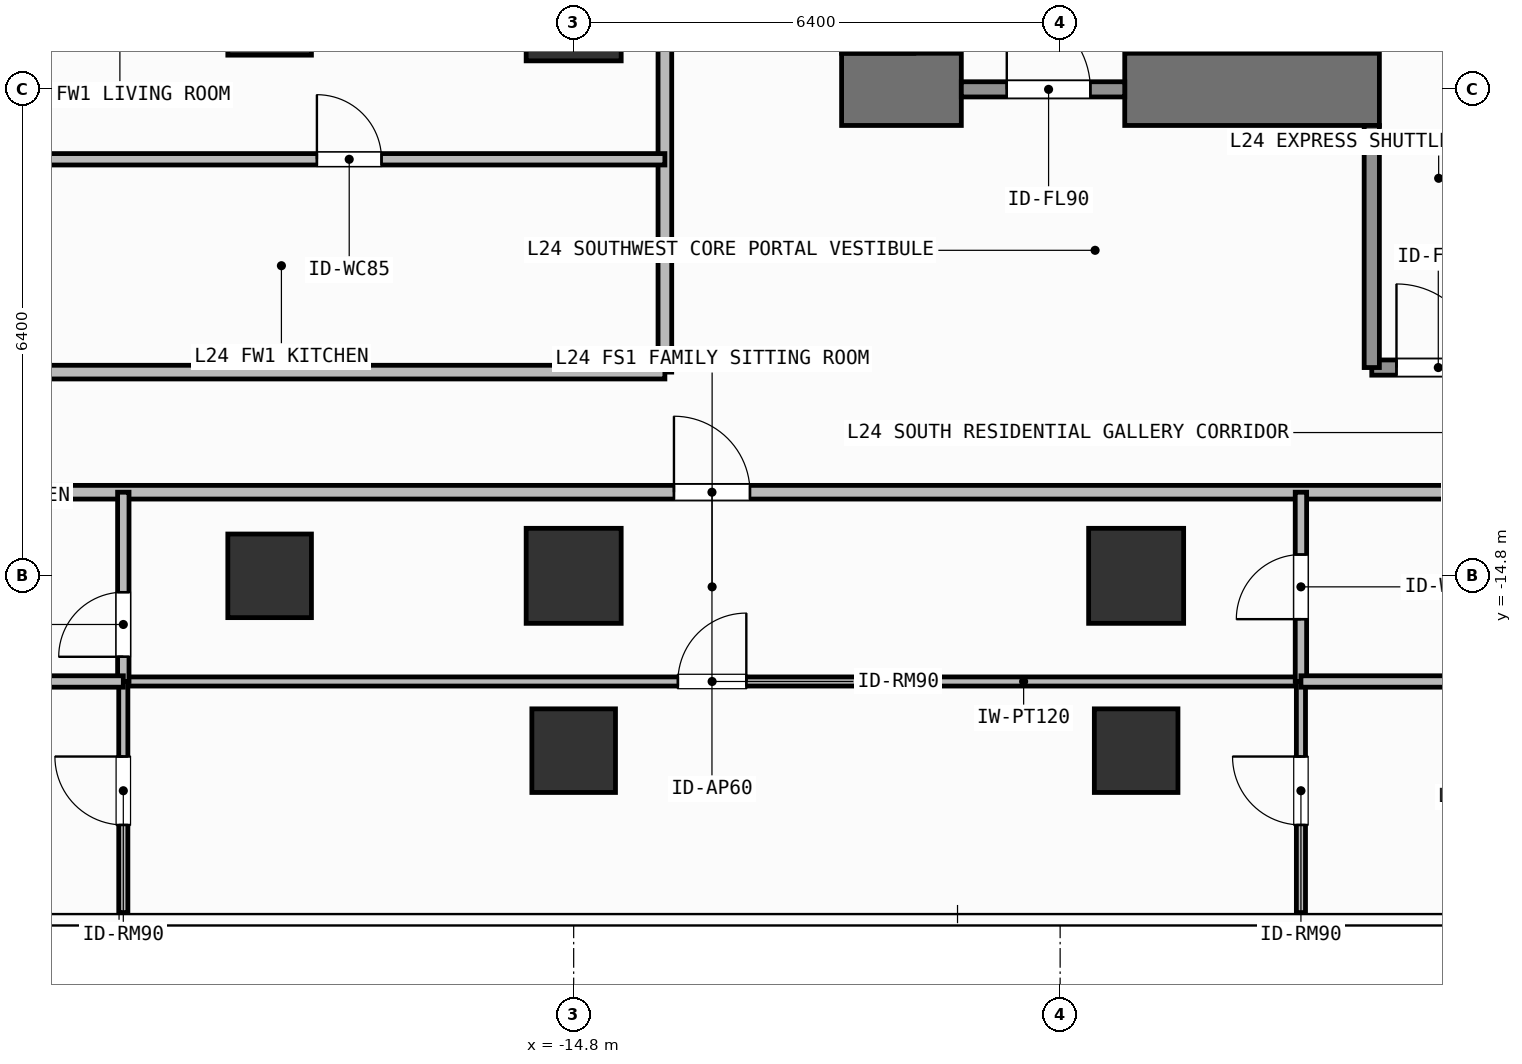
"""IFC4 building model, lengths in metres.
Left out: names, types, materials, properties, quantities, classifications, styles, units other than length and angle.
Written with IfcOpenShell. Run it as: python <this file> out.ifc"""

import sys

from ifc_helpers import new_model, si_unit, direction, frame, frame_2d, origin, origin_2d, place, context, subcontext, project, spatial, rectangle, extrude, element, fill, save


model = new_model("IFC4")
c1 = context("Model", 3, precision=1e-05, world=origin(), true_north=direction((0.0, 1.0)))
c2 = subcontext(c1, "Body", "Model", "MODEL_VIEW")
j1 = project(units=[si_unit("LENGTHUNIT", "METRE"), si_unit("PLANEANGLEUNIT", "RADIAN")], contexts=[c1])
p1 = place(None, origin())
s1 = spatial("IfcSite", under=j1, at=p1, CompositionType="ELEMENT")
p2 = place(p1, origin())
s2 = spatial("IfcBuilding", under=s1, at=p2, CompositionType="ELEMENT")
p3 = place(p2, frame((0.0, 0.0, 96.9)))
s3 = spatial("IfcBuildingStorey", under=s2, at=p3, CompositionType="ELEMENT", Elevation=96.9)
p4 = place(p3, frame((-11.275, -8.4, 0.0), z_axis=(0.0, 0.0, 1.0), x_axis=(1.0, 0.0, 0.0)))
e1 = element("IfcWall", 1, at=p4, inside=s3, PredefinedType="SHEAR", context=c2, shape_type="SweptSolid", body=[
    extrude(rectangle(XDim=1.575, YDim=0.95, at=frame_2d((0.788, 0.0))), origin(), (0.0, 0.0, 1.0), 3.9),
])
p5 = place(p3, frame((-7.55, -8.4, 0.0), z_axis=(0.0, 0.0, 1.0), x_axis=(1.0, 0.0, 0.0)))
e2 = element("IfcWall", 2, at=p5, inside=s3, PredefinedType="SHEAR", context=c2, shape_type="SweptSolid", body=[
    extrude(rectangle(XDim=3.35, YDim=0.95, at=frame_2d((1.675, 0.0))), origin(), (0.0, 0.0, 1.0), 3.9),
])
p6 = place(p3, frame((-10.8, -7.925, 0.0), z_axis=(0.0, 0.0, 1.0), x_axis=(0.0, 1.0, 0.0)))
e3 = element("IfcWall", 3, at=p6, inside=s3, PredefinedType="SHEAR", context=c2, shape_type="SweptSolid", body=[
    extrude(rectangle(XDim=15.85, YDim=0.95, at=frame_2d((7.925, 0.0))), origin(), (0.0, 0.0, 1.0), 3.9),
])
for number, where, z_axis, x_axis in (
    (4, (-14.8, -14.8, 0.0), (0.0, 0.0, 1.0), (1.0, 0.0, 0.0)),
    (5, (-7.4, -14.8, 0.0), (0.0, 0.0, 1.0), (1.0, 0.0, 0.0)),
    (6, (-14.8, -7.4, 0.0), (0.0, 0.0, 1.0), (1.0, 0.0, 0.0)),
):
    element("IfcColumn", number, at=place(p3, frame(where, z_axis=z_axis, x_axis=x_axis)), inside=s3, PredefinedType="COLUMN", context=c2, shape_type="SweptSolid", body=[
        extrude(rectangle(XDim=1.25, YDim=1.25, at=origin_2d()), origin(), (0.0, 0.0, 1.0), 3.9),
    ])
for number, where, z_axis, x_axis in (
    (7, (-18.8, -14.8, 0.0), (0.0, 0.0, 1.0), (1.0, 0.0, 0.0)),
    (8, (-18.8, -7.4, 0.0), (0.0, 0.0, 1.0), (1.0, 0.0, 0.0)),
    (9, (-14.8, -17.1, 0.0), (0.0, 0.0, 1.0), (1.0, 0.0, 0.0)),
    (10, (-7.4, -17.1, 0.0), (0.0, 0.0, 1.0), (1.0, 0.0, 0.0)),
):
    element("IfcColumn", number, at=place(p3, frame(where, z_axis=z_axis, x_axis=x_axis)), inside=s3, PredefinedType="COLUMN", context=c2, shape_type="SweptSolid", body=[
        extrude(rectangle(XDim=1.1, YDim=1.1, at=origin_2d()), origin(), (0.0, 0.0, 1.0), 3.9),
    ])
p7 = place(p3, frame((-9.7, -8.4, 0.0), z_axis=(0.0, 0.0, 1.0), x_axis=(1.0, 0.0, 0.0)))
e11 = element("IfcWall", 11, at=p7, inside=s3, PredefinedType="SOLIDWALL", context=c2, shape_type="SweptSolid", body=[
    extrude(rectangle(XDim=2.15, YDim=0.2, at=frame_2d((1.075, 0.0))), origin(), (0.0, 0.0, 1.0), 2.72),
])
p8 = place(p7, frame((0.598, 0.0, 0.0)))
e12 = element("IfcOpeningElement", 12, at=p8, cuts=e11, PredefinedType="OPENING", context=c2, shape_type="SweptSolid", body=[
    extrude(rectangle(XDim=1.1, YDim=2.15, at=frame_2d((0.55, 1.075))), frame((0.0, 0.11, 0.0), z_axis=(0.0, -1.0, 0.0), x_axis=(1.0, 0.0, 0.0)), (0.0, 0.0, 1.0), 0.22),
])
p9 = place(p3, frame((-4.3, -12.06, 0.0), z_axis=(0.0, 0.0, 1.0), x_axis=(1.0, 0.0, 0.0)))
e13 = element("IfcWall", 13, at=p9, inside=s3, PredefinedType="SOLIDWALL", context=c2, shape_type="SweptSolid", body=[
    extrude(rectangle(XDim=1.75, YDim=0.2, at=frame_2d((0.875, 0.0))), origin(), (0.0, 0.0, 1.0), 3.68),
])
p10 = place(p9, frame((0.325, 0.0, 0.0)))
e14 = element("IfcOpeningElement", 14, at=p10, cuts=e13, PredefinedType="OPENING", context=c2, shape_type="SweptSolid", body=[
    extrude(rectangle(XDim=1.1, YDim=2.15, at=frame_2d((0.55, 1.075))), frame((0.0, 0.11, 0.0), z_axis=(0.0, -1.0, 0.0), x_axis=(1.0, 0.0, 0.0)), (0.0, 0.0, 1.0), 0.22),
])
p11 = place(p3, frame((-24.42, -13.7, 0.0), z_axis=(0.0, 0.0, 1.0), x_axis=(1.0, 0.0, 0.0)))
e15 = element("IfcWall", 15, at=p11, inside=s3, PredefinedType="PARTITIONING", context=c2, shape_type="SweptSolid", body=[
    extrude(rectangle(XDim=25.394, YDim=0.18, at=frame_2d((12.697, 0.0))), origin(), (0.0, 0.0, 1.0), 3.68),
])
p12 = place(p11, frame((10.939, 0.0, 0.0)))
e16 = element("IfcOpeningElement", 16, at=p12, cuts=e15, PredefinedType="OPENING", context=c2, shape_type="SweptSolid", body=[
    extrude(rectangle(XDim=1.0, YDim=2.2, at=frame_2d((0.5, 1.1))), frame((0.0, 0.1, 0.0), z_axis=(0.0, -1.0, 0.0), x_axis=(1.0, 0.0, 0.0)), (0.0, 0.0, 1.0), 0.2),
])
p13 = place(p3, frame((-20.725, -16.19, 0.0), z_axis=(0.0, 0.0, 1.0), x_axis=(1.0, 0.0, 0.0)))
e17 = element("IfcWall", 17, at=p13, inside=s3, PredefinedType="PARTITIONING", context=c2, shape_type="SweptSolid", body=[
    extrude(rectangle(XDim=15.493, YDim=0.12, at=frame_2d((7.747, 0.0))), origin(), (0.0, 0.0, 1.0), 3.68),
])
p14 = place(p13, frame((7.296, 0.0, 0.0)))
e18 = element("IfcOpeningElement", 18, at=p14, cuts=e17, PredefinedType="OPENING", context=c2, shape_type="SweptSolid", body=[
    extrude(rectangle(XDim=0.9, YDim=2.1, at=frame_2d((0.45, 1.05))), frame((0.0, 0.07, 0.0), z_axis=(0.0, -1.0, 0.0), x_axis=(1.0, 0.0, 0.0)), (0.0, 0.0, 1.0), 0.14),
])
p15 = place(p3, frame((-20.725, -16.19, 0.0), z_axis=(0.0, 0.0, 1.0), x_axis=(0.0, 1.0, 0.0)))
e19 = element("IfcWall", 19, at=p15, inside=s3, PredefinedType="PARTITIONING", context=c2, shape_type="SweptSolid", body=[
    extrude(rectangle(XDim=2.49, YDim=0.15, at=frame_2d((1.245, 0.0))), origin(), (0.0, 0.0, 1.0), 3.68),
])
p16 = place(p15, frame((0.325, 0.0, 0.0)))
e20 = element("IfcOpeningElement", 20, at=p16, cuts=e19, PredefinedType="OPENING", context=c2, shape_type="SweptSolid", body=[
    extrude(rectangle(XDim=0.85, YDim=2.1, at=frame_2d((0.425, 1.05))), frame((0.0, 0.085, 0.0), z_axis=(0.0, -1.0, 0.0), x_axis=(1.0, 0.0, 0.0)), (0.0, 0.0, 1.0), 0.17),
])
p17 = place(p3, frame((-20.725, -19.23, 0.0), z_axis=(0.0, 0.0, 1.0), x_axis=(0.0, 1.0, 0.0)))
e21 = element("IfcWall", 21, at=p17, inside=s3, PredefinedType="PARTITIONING", context=c2, shape_type="SweptSolid", body=[
    extrude(rectangle(XDim=3.04, YDim=0.12, at=frame_2d((1.52, 0.0))), origin(), (0.0, 0.0, 1.0), 3.68),
])
p18 = place(p17, frame((1.153, 0.0, 0.0)))
e22 = element("IfcOpeningElement", 22, at=p18, cuts=e21, PredefinedType="OPENING", context=c2, shape_type="SweptSolid", body=[
    extrude(rectangle(XDim=0.9, YDim=2.1, at=frame_2d((0.45, 1.05))), frame((0.0, 0.07, 0.0), z_axis=(0.0, -1.0, 0.0), x_axis=(1.0, 0.0, 0.0)), (0.0, 0.0, 1.0), 0.14),
])
p19 = place(p3, frame((-5.232, -16.19, 0.0), z_axis=(0.0, 0.0, 1.0), x_axis=(0.0, 1.0, 0.0)))
e23 = element("IfcWall", 23, at=p19, inside=s3, PredefinedType="PARTITIONING", context=c2, shape_type="SweptSolid", body=[
    extrude(rectangle(XDim=2.49, YDim=0.15, at=frame_2d((1.245, 0.0))), origin(), (0.0, 0.0, 1.0), 3.68),
])
p20 = place(p19, frame((0.82, 0.0, 0.0)))
e24 = element("IfcOpeningElement", 24, at=p20, cuts=e23, PredefinedType="OPENING", context=c2, shape_type="SweptSolid", body=[
    extrude(rectangle(XDim=0.85, YDim=2.1, at=frame_2d((0.425, 1.05))), frame((0.0, 0.085, 0.0), z_axis=(0.0, -1.0, 0.0), x_axis=(1.0, 0.0, 0.0)), (0.0, 0.0, 1.0), 0.17),
])
p21 = place(p3, frame((-5.232, -19.23, 0.0), z_axis=(0.0, 0.0, 1.0), x_axis=(0.0, 1.0, 0.0)))
e25 = element("IfcWall", 25, at=p21, inside=s3, PredefinedType="PARTITIONING", context=c2, shape_type="SweptSolid", body=[
    extrude(rectangle(XDim=3.04, YDim=0.12, at=frame_2d((1.52, 0.0))), origin(), (0.0, 0.0, 1.0), 3.68),
])
p22 = place(p21, frame((1.153, 0.0, 0.0)))
e26 = element("IfcOpeningElement", 26, at=p22, cuts=e25, PredefinedType="OPENING", context=c2, shape_type="SweptSolid", body=[
    extrude(rectangle(XDim=0.9, YDim=2.1, at=frame_2d((0.45, 1.05))), frame((0.0, 0.07, 0.0), z_axis=(0.0, -1.0, 0.0), x_axis=(1.0, 0.0, 0.0)), (0.0, 0.0, 1.0), 0.14),
])
p23 = place(p3, frame((-13.6, -12.12, 0.0), z_axis=(0.0, 0.0, 1.0), x_axis=(0.0, 1.0, 0.0)))
e27 = element("IfcWall", 27, at=p23, inside=s3, PredefinedType="PARTITIONING", context=c2, shape_type="SweptSolid", body=[
    extrude(rectangle(XDim=10.52, YDim=0.18, at=frame_2d((5.26, 0.0))), origin(), (0.0, 0.0, 1.0), 3.68),
])
p24 = place(p23, frame((5.468, 0.0, 0.0)))
e28 = element("IfcOpeningElement", 28, at=p24, cuts=e27, PredefinedType="OPENING", context=c2, shape_type="SweptSolid", body=[
    extrude(rectangle(XDim=1.0, YDim=2.2, at=frame_2d((0.5, 1.1))), frame((0.0, 0.1, 0.0), z_axis=(0.0, -1.0, 0.0), x_axis=(1.0, 0.0, 0.0)), (0.0, 0.0, 1.0), 0.2),
])
p25 = place(p3, frame((-23.69, -9.32, 0.0), z_axis=(0.0, 0.0, 1.0), x_axis=(1.0, 0.0, 0.0)))
e29 = element("IfcWall", 29, at=p25, inside=s3, PredefinedType="PARTITIONING", context=c2, shape_type="SweptSolid", body=[
    extrude(rectangle(XDim=10.09, YDim=0.15, at=frame_2d((5.045, 0.0))), origin(), (0.0, 0.0, 1.0), 3.68),
])
p26 = place(p25, frame((5.512, 0.0, 0.0)))
e30 = element("IfcOpeningElement", 30, at=p26, cuts=e29, PredefinedType="OPENING", context=c2, shape_type="SweptSolid", body=[
    extrude(rectangle(XDim=0.85, YDim=2.1, at=frame_2d((0.425, 1.05))), frame((0.0, 0.085, 0.0), z_axis=(0.0, -1.0, 0.0), x_axis=(1.0, 0.0, 0.0)), (0.0, 0.0, 1.0), 0.17),
])
p27 = place(p3, frame((-4.3, -12.06, 0.0), z_axis=(0.0, 0.0, 1.0), x_axis=(0.0, 1.0, 0.0)))
e31 = element("IfcWall", 31, at=p27, inside=s3, PredefinedType="SOLIDWALL", context=c2, shape_type="SweptSolid", body=[
    extrude(rectangle(XDim=3.185, YDim=0.2, at=frame_2d((1.593, 0.0))), origin(), (0.0, 0.0, 1.0), 3.68),
])
p28 = place(p3, frame((-24.42, -16.19, 0.0), z_axis=(0.0, 0.0, 1.0), x_axis=(1.0, 0.0, 0.0)))
e32 = element("IfcWall", 32, at=p28, inside=s3, PredefinedType="PARTITIONING", context=c2, shape_type="SweptSolid", body=[
    extrude(rectangle(XDim=3.695, YDim=0.15, at=frame_2d((1.847, 0.0))), origin(), (0.0, 0.0, 1.0), 3.68),
])
p29 = place(p3, frame((-5.232, -16.19, 0.0), z_axis=(0.0, 0.0, 1.0), x_axis=(1.0, 0.0, 0.0)))
e33 = element("IfcWall", 33, at=p29, inside=s3, PredefinedType="PARTITIONING", context=c2, shape_type="SweptSolid", body=[
    extrude(rectangle(XDim=6.206, YDim=0.15, at=frame_2d((3.103, 0.0))), origin(), (0.0, 0.0, 1.0), 3.68),
])
p30 = place(p3, frame((-27.93, -12.12, 0.0), z_axis=(0.0, 0.0, 1.0), x_axis=(1.0, 0.0, 0.0)))
e34 = element("IfcWall", 34, at=p30, inside=s3, PredefinedType="PARTITIONING", context=c2, shape_type="SweptSolid", body=[
    extrude(rectangle(XDim=14.33, YDim=0.18, at=frame_2d((7.165, 0.0))), origin(), (0.0, 0.0, 1.0), 3.68),
])
p31 = place(p8, origin())
e35 = element("IfcDoor", 35, at=p31, inside=s3, OperationType="SINGLE_SWING_LEFT", PredefinedType="DOOR", context=c2, shape_type="SweptSolid", body=[
    extrude(rectangle(XDim=1.1, YDim=2.15, at=frame_2d((0.55, 1.075))), frame((0.0, 0.025, 0.0), z_axis=(0.0, -1.0, 0.0), x_axis=(1.0, 0.0, 0.0)), (0.0, 0.0, 1.0), 0.05),
])
fill(e12, e35)
p32 = place(p10, origin())
e36 = element("IfcDoor", 36, at=p32, inside=s3, OperationType="SINGLE_SWING_LEFT", PredefinedType="DOOR", context=c2, shape_type="SweptSolid", body=[
    extrude(rectangle(XDim=1.1, YDim=2.15, at=frame_2d((0.55, 1.075))), frame((0.0, 0.025, 0.0), z_axis=(0.0, -1.0, 0.0), x_axis=(1.0, 0.0, 0.0)), (0.0, 0.0, 1.0), 0.05),
])
fill(e14, e36)
p33 = place(p12, origin())
e37 = element("IfcDoor", 37, at=p33, inside=s3, OperationType="SINGLE_SWING_LEFT", PredefinedType="DOOR", context=c2, shape_type="SweptSolid", body=[
    extrude(rectangle(XDim=1.0, YDim=2.2, at=frame_2d((0.5, 1.1))), frame((0.0, 0.025, 0.0), z_axis=(0.0, -1.0, 0.0), x_axis=(1.0, 0.0, 0.0)), (0.0, 0.0, 1.0), 0.05),
])
fill(e16, e37)
p34 = place(p14, origin())
e38 = element("IfcDoor", 38, at=p34, inside=s3, OperationType="SINGLE_SWING_RIGHT", PredefinedType="DOOR", context=c2, shape_type="SweptSolid", body=[
    extrude(rectangle(XDim=0.9, YDim=2.1, at=frame_2d((0.45, 1.05))), frame((0.0, 0.025, 0.0), z_axis=(0.0, -1.0, 0.0), x_axis=(1.0, 0.0, 0.0)), (0.0, 0.0, 1.0), 0.05),
])
fill(e18, e38)
p35 = place(p16, origin())
e39 = element("IfcDoor", 39, at=p35, inside=s3, OperationType="SINGLE_SWING_LEFT", PredefinedType="DOOR", context=c2, shape_type="SweptSolid", body=[
    extrude(rectangle(XDim=0.85, YDim=2.1, at=frame_2d((0.425, 1.05))), frame((0.0, 0.025, 0.0), z_axis=(0.0, -1.0, 0.0), x_axis=(1.0, 0.0, 0.0)), (0.0, 0.0, 1.0), 0.05),
])
fill(e20, e39)
p36 = place(p18, origin())
e40 = element("IfcDoor", 40, at=p36, inside=s3, OperationType="SINGLE_SWING_RIGHT", PredefinedType="DOOR", context=c2, shape_type="SweptSolid", body=[
    extrude(rectangle(XDim=0.9, YDim=2.1, at=frame_2d((0.45, 1.05))), frame((0.0, 0.025, 0.0), z_axis=(0.0, -1.0, 0.0), x_axis=(1.0, 0.0, 0.0)), (0.0, 0.0, 1.0), 0.05),
])
fill(e22, e40)
p37 = place(p20, origin())
e41 = element("IfcDoor", 41, at=p37, inside=s3, OperationType="SINGLE_SWING_LEFT", PredefinedType="DOOR", context=c2, shape_type="SweptSolid", body=[
    extrude(rectangle(XDim=0.85, YDim=2.1, at=frame_2d((0.425, 1.05))), frame((0.0, 0.025, 0.0), z_axis=(0.0, -1.0, 0.0), x_axis=(1.0, 0.0, 0.0)), (0.0, 0.0, 1.0), 0.05),
])
fill(e24, e41)
p38 = place(p22, origin())
e42 = element("IfcDoor", 42, at=p38, inside=s3, OperationType="SINGLE_SWING_RIGHT", PredefinedType="DOOR", context=c2, shape_type="SweptSolid", body=[
    extrude(rectangle(XDim=0.9, YDim=2.1, at=frame_2d((0.45, 1.05))), frame((0.0, 0.025, 0.0), z_axis=(0.0, -1.0, 0.0), x_axis=(1.0, 0.0, 0.0)), (0.0, 0.0, 1.0), 0.05),
])
fill(e26, e42)
p39 = place(p26, origin())
e43 = element("IfcDoor", 43, at=p39, inside=s3, OperationType="SINGLE_SWING_LEFT", PredefinedType="DOOR", context=c2, shape_type="SweptSolid", body=[
    extrude(rectangle(XDim=0.85, YDim=2.1, at=frame_2d((0.425, 1.05))), frame((0.0, 0.025, 0.0), z_axis=(0.0, -1.0, 0.0), x_axis=(1.0, 0.0, 0.0)), (0.0, 0.0, 1.0), 0.05),
])
fill(e30, e43)
save(model, sys.argv[1])
